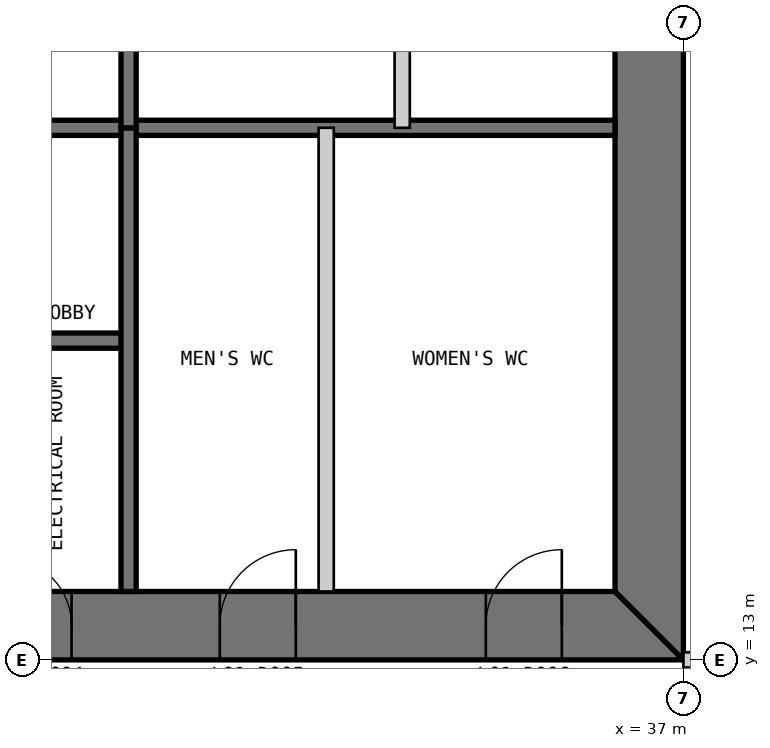
"""IFC4 building model, lengths in metres.
Left out: names, types, materials, properties, quantities, classifications, styles, units other than length and angle.
Written with IfcOpenShell. Run it as: python <this file> out.ifc"""

import sys

from ifc_helpers import new_model, si_unit, direction, frame, frame_2d, origin, place, context, subcontext, project, spatial, polyline, rectangle, outline, extrude, element, fill, save


model = new_model("IFC4")
c1 = context("Model", 3, precision=1e-05, world=origin(), true_north=direction((0.0, 1.0)))
c2 = subcontext(c1, "Body", "Model", "MODEL_VIEW")
j1 = project(units=[si_unit("LENGTHUNIT", "METRE"), si_unit("PLANEANGLEUNIT", "RADIAN")], contexts=[c1])
p1 = place(None, origin())
s1 = spatial("IfcSite", under=j1, at=p1, CompositionType="ELEMENT")
p2 = place(p1, origin())
s2 = spatial("IfcBuilding", under=s1, at=p2, CompositionType="ELEMENT")
p3 = place(p2, frame((0.0, 0.0, 7.0)))
s3 = spatial("IfcBuildingStorey", under=s2, at=p3, CompositionType="ELEMENT", Elevation=7.0)
p4 = place(p3, frame((13.0, 13.45, 0.0), z_axis=(0.0, 0.0, 1.0), x_axis=(1.0, 0.0, 0.0)))
e1 = element("IfcWall", 1, at=p4, inside=s3, PredefinedType="SHEAR", context=c2, shape_type="SweptSolid", body=[
    extrude(outline(polyline([(0.0, -0.45), (24.0, -0.45), (23.1, 0.45), (0.9, 0.45), (0.0, -0.45)])), origin(), (0.0, 0.0, 1.0), 4.8),
])
p5 = place(p4, frame((4.9, 0.0, 0.0)))
e2 = element("IfcOpeningElement", 2, at=p5, cuts=e1, PredefinedType="OPENING", context=c2, shape_type="SweptSolid", body=[
    extrude(rectangle(XDim=1.0, YDim=2.2, at=frame_2d((0.5, 1.1))), frame((0.0, 0.46, 0.0), z_axis=(0.0, -1.0, 0.0), x_axis=(1.0, 0.0, 0.0)), (0.0, 0.0, 1.0), 0.92),
])
p6 = place(p4, frame((8.9, 0.0, 0.0)))
e3 = element("IfcOpeningElement", 3, at=p6, cuts=e1, PredefinedType="OPENING", context=c2, shape_type="SweptSolid", body=[
    extrude(rectangle(XDim=1.1, YDim=2.2, at=frame_2d((0.55, 1.1))), frame((0.0, 0.46, 0.0), z_axis=(0.0, -1.0, 0.0), x_axis=(1.0, 0.0, 0.0)), (0.0, 0.0, 1.0), 0.92),
])
p7 = place(p4, frame((15.05, 0.0, 0.0)))
e4 = element("IfcOpeningElement", 4, at=p7, cuts=e1, PredefinedType="OPENING", context=c2, shape_type="SweptSolid", body=[
    extrude(rectangle(XDim=0.9, YDim=2.2, at=frame_2d((0.45, 1.1))), frame((0.0, 0.46, 0.0), z_axis=(0.0, -1.0, 0.0), x_axis=(1.0, 0.0, 0.0)), (0.0, 0.0, 1.0), 0.92),
])
p8 = place(p4, frame((17.9, 0.0, 0.0)))
e5 = element("IfcOpeningElement", 5, at=p8, cuts=e1, PredefinedType="OPENING", context=c2, shape_type="SweptSolid", body=[
    extrude(rectangle(XDim=1.0, YDim=2.2, at=frame_2d((0.5, 1.1))), frame((0.0, 0.46, 0.0), z_axis=(0.0, -1.0, 0.0), x_axis=(1.0, 0.0, 0.0)), (0.0, 0.0, 1.0), 0.92),
])
p9 = place(p4, frame((21.4, 0.0, 0.0)))
e6 = element("IfcOpeningElement", 6, at=p9, cuts=e1, PredefinedType="OPENING", context=c2, shape_type="SweptSolid", body=[
    extrude(rectangle(XDim=1.0, YDim=2.2, at=frame_2d((0.5, 1.1))), frame((0.0, 0.46, 0.0), z_axis=(0.0, -1.0, 0.0), x_axis=(1.0, 0.0, 0.0)), (0.0, 0.0, 1.0), 0.92),
])
p10 = place(p3, frame((36.55, 13.9, 0.0), z_axis=(0.0, 0.0, 1.0), x_axis=(0.0, 1.0, 0.0)))
e7 = element("IfcWall", 7, at=p10, inside=s3, PredefinedType="SHEAR", context=c2, shape_type="SweptSolid", body=[
    extrude(outline(polyline([(-0.9, -0.45), (23.1, -0.45), (22.2, 0.45), (0.0, 0.45), (-0.9, -0.45)])), origin(), (0.0, 0.0, 1.0), 4.8),
])
p11 = place(p10, frame((20.2, 0.0, 0.0)))
e8 = element("IfcOpeningElement", 8, at=p11, cuts=e7, PredefinedType="OPENING", context=c2, shape_type="SweptSolid", body=[
    extrude(rectangle(XDim=1.0, YDim=2.2, at=frame_2d((0.5, 1.1))), frame((0.0, 0.46, 0.0), z_axis=(0.0, -1.0, 0.0), x_axis=(1.0, 0.0, 0.0)), (0.0, 0.0, 1.0), 0.92),
])
p12 = place(p10, frame((17.25, 0.0, 0.0)))
e9 = element("IfcOpeningElement", 9, at=p12, cuts=e7, PredefinedType="OPENING", context=c2, shape_type="SweptSolid", body=[
    extrude(rectangle(XDim=0.9, YDim=2.2, at=frame_2d((0.45, 1.1))), frame((0.0, 0.46, 0.0), z_axis=(0.0, -1.0, 0.0), x_axis=(1.0, 0.0, 0.0)), (0.0, 0.0, 1.0), 0.92),
])
p13 = place(p3, frame((20.3, 17.2, 0.0), z_axis=(0.0, 0.0, 1.0), x_axis=(1.0, 0.0, 0.0)))
e10 = element("IfcWall", 10, at=p13, inside=s3, PredefinedType="SOLIDWALL", context=c2, shape_type="SweptSolid", body=[
    extrude(rectangle(XDim=9.4, YDim=0.2, at=frame_2d((4.7, 0.0))), origin(), (0.0, 0.0, 1.0), 4.6),
])
p14 = place(p13, frame((0.25, 0.0, 0.0)))
e11 = element("IfcOpeningElement", 11, at=p14, cuts=e10, PredefinedType="OPENING", context=c2, shape_type="SweptSolid", body=[
    extrude(rectangle(XDim=1.0, YDim=2.2, at=frame_2d((0.5, 1.1))), frame((0.0, 0.11, 0.0), z_axis=(0.0, -1.0, 0.0), x_axis=(1.0, 0.0, 0.0)), (0.0, 0.0, 1.0), 0.22),
])
p15 = place(p3, frame((20.3, 20.0, 0.0), z_axis=(0.0, 0.0, 1.0), x_axis=(1.0, 0.0, 0.0)))
e12 = element("IfcWall", 12, at=p15, inside=s3, PredefinedType="SOLIDWALL", context=c2, shape_type="SweptSolid", body=[
    extrude(rectangle(XDim=15.8, YDim=0.2, at=frame_2d((7.9, 0.0))), origin(), (0.0, 0.0, 1.0), 4.6),
])
p16 = place(p3, frame((29.7, 13.9, 0.0), z_axis=(0.0, 0.0, 1.0), x_axis=(0.0, 1.0, 0.0)))
e13 = element("IfcWall", 13, at=p16, inside=s3, PredefinedType="SOLIDWALL", context=c2, shape_type="SweptSolid", body=[
    extrude(rectangle(XDim=6.1, YDim=0.2, at=frame_2d((3.05, 0.0))), origin(), (0.0, 0.0, 1.0), 4.6),
])
p17 = place(p3, frame((32.3, 13.9, 0.0), z_axis=(0.0, 0.0, 1.0), x_axis=(0.0, 1.0, 0.0)))
e14 = element("IfcWall", 14, at=p17, inside=s3, PredefinedType="PARTITIONING", context=c2, shape_type="SweptSolid", body=[
    extrude(rectangle(XDim=6.1, YDim=0.2, at=frame_2d((3.05, 0.0))), origin(), (0.0, 0.0, 1.0), 4.6),
])
p18 = place(p3, frame((33.3, 36.1, 0.0), z_axis=(0.0, 0.0, 1.0), x_axis=(0.0, -1.0, 0.0)))
e15 = element("IfcWall", 15, at=p18, inside=s3, PredefinedType="PARTITIONING", context=c2, shape_type="SweptSolid", body=[
    extrude(rectangle(XDim=16.1, YDim=0.2, at=frame_2d((8.05, 0.0))), origin(), (0.0, 0.0, 1.0), 4.6),
])
p19 = place(p18, frame((4.1, 0.0, 0.0)))
e16 = element("IfcOpeningElement", 16, at=p19, cuts=e15, PredefinedType="OPENING", context=c2, shape_type="SweptSolid", body=[
    extrude(rectangle(XDim=0.9, YDim=2.2, at=frame_2d((0.45, 1.1))), frame((0.0, 0.11, 0.0), z_axis=(0.0, -1.0, 0.0), x_axis=(1.0, 0.0, 0.0)), (0.0, 0.0, 1.0), 0.22),
])
p20 = place(p3, frame((29.7, 36.1, 0.0), z_axis=(0.0, 0.0, 1.0), x_axis=(0.0, -1.0, 0.0)))
e17 = element("IfcWall", 17, at=p20, inside=s3, PredefinedType="SOLIDWALL", context=c2, shape_type="SweptSolid", body=[
    extrude(rectangle(XDim=16.1, YDim=0.2, at=frame_2d((8.05, 0.0))), origin(), (0.0, 0.0, 1.0), 4.6),
])
p21 = place(p3, frame((37.0, 13.0, 0.0), z_axis=(0.0, 0.0, 1.0), x_axis=(1.0, 0.0, 0.0)))
e18 = element("IfcWall", 18, at=p21, inside=s3, PredefinedType="PARTITIONING", context=c2, shape_type="SweptSolid", body=[
    extrude(rectangle(XDim=6.0, YDim=0.2, at=frame_2d((3.0, 0.0))), origin(), (0.0, 0.0, 1.0), 3.653),
])
p22 = place(p7, origin())
e19 = element("IfcDoor", 19, at=p22, inside=s3, OperationType="SINGLE_SWING_LEFT", PredefinedType="DOOR", context=c2, shape_type="SweptSolid", body=[
    extrude(rectangle(XDim=0.9, YDim=2.2, at=frame_2d((0.45, 1.1))), frame((0.0, 0.025, 0.0), z_axis=(0.0, -1.0, 0.0), x_axis=(1.0, 0.0, 0.0)), (0.0, 0.0, 1.0), 0.05),
    extrude(outline(polyline([(0.0, 0.0), (0.04, 0.0), (0.04, 2.16), (0.86, 2.16), (0.86, 0.0), (0.9, 0.0), (0.9, 2.2), (0.0, 2.2), (0.0, 0.0)])), frame((0.0, 0.3, 0.0), z_axis=(0.0, -1.0, 0.0), x_axis=(1.0, 0.0, 0.0)), (0.0, 0.0, 1.0), 0.6),
])
fill(e4, e19)
p23 = place(p8, origin())
e20 = element("IfcDoor", 20, at=p23, inside=s3, OperationType="SINGLE_SWING_RIGHT", PredefinedType="DOOR", context=c2, shape_type="SweptSolid", body=[
    extrude(rectangle(XDim=1.0, YDim=2.2, at=frame_2d((0.5, 1.1))), frame((0.0, 0.025, 0.0), z_axis=(0.0, -1.0, 0.0), x_axis=(1.0, 0.0, 0.0)), (0.0, 0.0, 1.0), 0.05),
    extrude(outline(polyline([(0.0, 0.0), (0.04, 0.0), (0.04, 2.16), (0.96, 2.16), (0.96, 0.0), (1.0, 0.0), (1.0, 2.2), (0.0, 2.2), (0.0, 0.0)])), frame((0.0, 0.3, 0.0), z_axis=(0.0, -1.0, 0.0), x_axis=(1.0, 0.0, 0.0)), (0.0, 0.0, 1.0), 0.6),
])
fill(e5, e20)
p24 = place(p9, origin())
e21 = element("IfcDoor", 21, at=p24, inside=s3, OperationType="SINGLE_SWING_RIGHT", PredefinedType="DOOR", context=c2, shape_type="SweptSolid", body=[
    extrude(rectangle(XDim=1.0, YDim=2.2, at=frame_2d((0.5, 1.1))), frame((0.0, 0.025, 0.0), z_axis=(0.0, -1.0, 0.0), x_axis=(1.0, 0.0, 0.0)), (0.0, 0.0, 1.0), 0.05),
    extrude(outline(polyline([(0.0, 0.0), (0.04, 0.0), (0.04, 2.16), (0.96, 2.16), (0.96, 0.0), (1.0, 0.0), (1.0, 2.2), (0.0, 2.2), (0.0, 0.0)])), frame((0.0, 0.3, 0.0), z_axis=(0.0, -1.0, 0.0), x_axis=(1.0, 0.0, 0.0)), (0.0, 0.0, 1.0), 0.6),
])
fill(e6, e21)
save(model, sys.argv[1])
